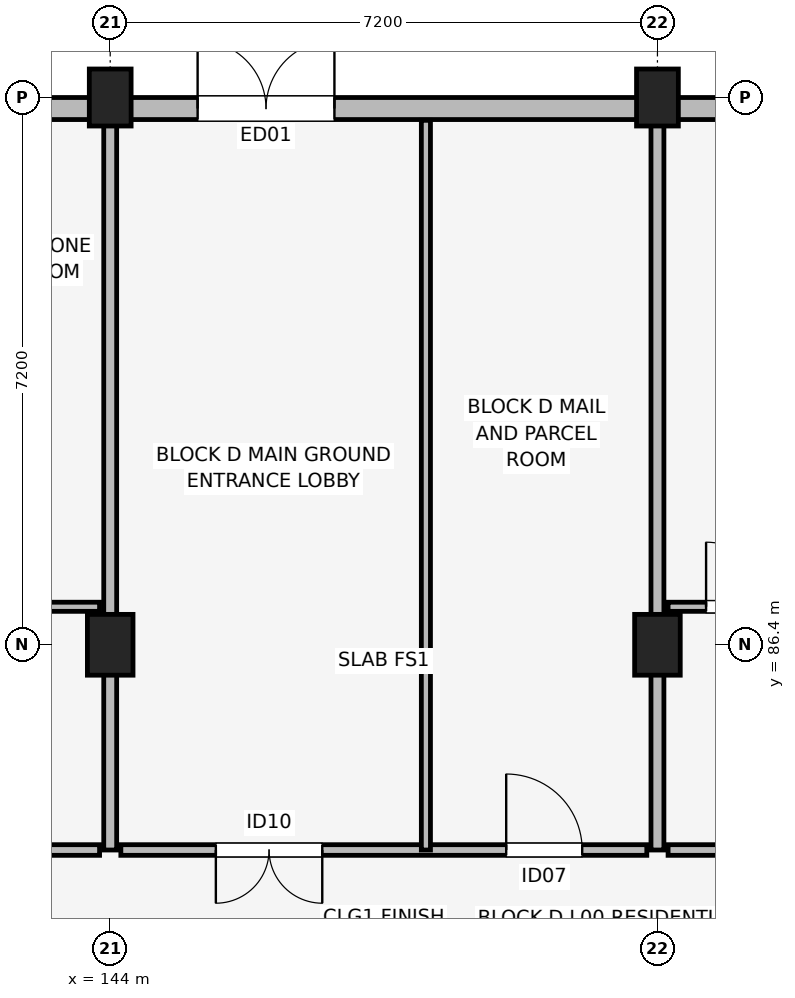
"""IFC4 building model, lengths in metres.
Left out: names, types, materials, properties, quantities, classifications, styles, units other than length and angle.
Written with IfcOpenShell. Run it as: python <this file> out.ifc"""

import sys

from ifc_helpers import new_model, si_unit, direction, frame, frame_2d, origin, origin_2d, place, context, subcontext, project, spatial, rectangle, extrude, element, fill, save


model = new_model("IFC4")
c1 = context("Model", 3, precision=1e-05, world=origin(), true_north=direction((0.0, 1.0)))
c2 = subcontext(c1, "Body", "Model", "MODEL_VIEW")
j1 = project(units=[si_unit("LENGTHUNIT", "METRE"), si_unit("PLANEANGLEUNIT", "RADIAN")], contexts=[c1])
p1 = place(None, origin())
s1 = spatial("IfcSite", under=j1, at=p1, CompositionType="ELEMENT")
p2 = place(p1, origin())
s2 = spatial("IfcBuilding", under=s1, at=p2, CompositionType="ELEMENT")
p3 = place(p2, origin())
s3 = spatial("IfcBuildingStorey", under=s2, at=p3, CompositionType="ELEMENT", Elevation=0.0)
p4 = place(p3, frame((144.0, 86.4, 0.0), z_axis=(0.0, 0.0, 1.0), x_axis=(1.0, 0.0, 0.0)))
e1 = element("IfcColumn", 1, at=p4, inside=s3, PredefinedType="COLUMN", context=c2, shape_type="SweptSolid", body=[
    extrude(rectangle(XDim=0.6, YDim=0.8, at=origin_2d()), origin(), (0.0, 0.0, 1.0), 4.5),
])
p5 = place(p3, frame((144.0, 93.6, 0.0), z_axis=(0.0, 0.0, 1.0), x_axis=(1.0, 0.0, 0.0)))
e2 = element("IfcColumn", 2, at=p5, inside=s3, PredefinedType="COLUMN", context=c2, shape_type="SweptSolid", body=[
    extrude(rectangle(XDim=0.55, YDim=0.75, at=origin_2d()), origin(), (0.0, 0.0, 1.0), 4.5),
])
p6 = place(p3, frame((151.2, 86.4, 0.0), z_axis=(0.0, 0.0, 1.0), x_axis=(1.0, 0.0, 0.0)))
e3 = element("IfcColumn", 3, at=p6, inside=s3, PredefinedType="COLUMN", context=c2, shape_type="SweptSolid", body=[
    extrude(rectangle(XDim=0.6, YDim=0.8, at=origin_2d()), origin(), (0.0, 0.0, 1.0), 4.5),
])
p7 = place(p3, frame((151.2, 93.6, 0.0), z_axis=(0.0, 0.0, 1.0), x_axis=(1.0, 0.0, 0.0)))
e4 = element("IfcColumn", 4, at=p7, inside=s3, PredefinedType="COLUMN", context=c2, shape_type="SweptSolid", body=[
    extrude(rectangle(XDim=0.55, YDim=0.75, at=origin_2d()), origin(), (0.0, 0.0, 1.0), 4.5),
])
p8 = place(p3, frame((162.8, 93.455, 0.0), z_axis=(0.0, 0.0, 1.0), x_axis=(-1.0, 0.0, 0.0)))
e5 = element("IfcWall", 5, at=p8, inside=s3, PredefinedType="SOLIDWALL", context=c2, shape_type="SweptSolid", body=[
    extrude(rectangle(XDim=30.4, YDim=0.29, at=frame_2d((15.2, 0.0))), origin(), (0.0, 0.0, 1.0), 3.33),
])
p9 = place(p8, frame((17.65, 0.0, 0.0), z_axis=(0.0, 0.0, 1.0), x_axis=(-1.0, 0.0, 0.0)))
e6 = element("IfcOpeningElement", 6, at=p9, cuts=e5, PredefinedType="OPENING", context=c2, shape_type="SweptSolid", body=[
    extrude(rectangle(XDim=1.8, YDim=2.4, at=frame_2d((0.9, 1.2))), frame((0.0, 0.155, 0.0), z_axis=(0.0, -1.0, 0.0), x_axis=(1.0, 0.0, 0.0)), (0.0, 0.0, 1.0), 0.31),
])
p10 = place(p8, frame((27.343, 0.0, 0.7)))
e7 = element("IfcOpeningElement", 7, at=p10, cuts=e5, PredefinedType="OPENING", context=c2, shape_type="SweptSolid", body=[
    extrude(rectangle(XDim=1.86, YDim=1.6, at=frame_2d((0.93, 0.8))), frame((0.0, 0.155, 0.0), z_axis=(0.0, -1.0, 0.0), x_axis=(1.0, 0.0, 0.0)), (0.0, 0.0, 1.0), 0.31),
])
p11 = place(p8, frame((24.238, 0.0, 0.75)))
e8 = element("IfcOpeningElement", 8, at=p11, cuts=e5, PredefinedType="OPENING", context=c2, shape_type="SweptSolid", body=[
    extrude(rectangle(XDim=0.98, YDim=1.45, at=frame_2d((0.49, 0.725))), frame((0.0, 0.155, 0.0), z_axis=(0.0, -1.0, 0.0), x_axis=(1.0, 0.0, 0.0)), (0.0, 0.0, 1.0), 0.31),
])
p12 = place(p8, frame((20.357, 0.0, 0.7)))
e9 = element("IfcOpeningElement", 9, at=p12, cuts=e5, PredefinedType="OPENING", context=c2, shape_type="SweptSolid", body=[
    extrude(rectangle(XDim=2.15, YDim=1.65, at=frame_2d((1.075, 0.825))), frame((0.0, 0.155, 0.0), z_axis=(0.0, -1.0, 0.0), x_axis=(1.0, 0.0, 0.0)), (0.0, 0.0, 1.0), 0.31),
])
p13 = place(p8, frame((6.85, 0.0, 0.7)))
e10 = element("IfcOpeningElement", 10, at=p13, cuts=e5, PredefinedType="OPENING", context=c2, shape_type="SweptSolid", body=[
    extrude(rectangle(XDim=2.3, YDim=1.65, at=frame_2d((1.15, 0.825))), frame((0.0, 0.155, 0.0), z_axis=(0.0, -1.0, 0.0), x_axis=(1.0, 0.0, 0.0)), (0.0, 0.0, 1.0), 0.31),
])
p14 = place(p8, frame((2.583, 0.0, 0.75)))
e11 = element("IfcOpeningElement", 11, at=p14, cuts=e5, PredefinedType="OPENING", context=c2, shape_type="SweptSolid", body=[
    extrude(rectangle(XDim=1.34, YDim=1.55, at=frame_2d((0.67, 0.775))), frame((0.0, 0.155, 0.0), z_axis=(0.0, -1.0, 0.0), x_axis=(1.0, 0.0, 0.0)), (0.0, 0.0, 1.0), 0.31),
])
p15 = place(p8, frame((0.555, 0.0, 0.75)))
e12 = element("IfcOpeningElement", 12, at=p15, cuts=e5, PredefinedType="OPENING", context=c2, shape_type="SweptSolid", body=[
    extrude(rectangle(XDim=1.46, YDim=1.55, at=frame_2d((0.73, 0.775))), frame((0.0, 0.155, 0.0), z_axis=(0.0, -1.0, 0.0), x_axis=(1.0, 0.0, 0.0)), (0.0, 0.0, 1.0), 0.31),
])
p16 = place(p3, frame((136.94, 83.7, 0.0), z_axis=(0.0, 0.0, 1.0), x_axis=(1.0, 0.0, 0.0)))
e13 = element("IfcWall", 13, at=p16, inside=s3, PredefinedType="PARTITIONING", context=c2, shape_type="SweptSolid", body=[
    extrude(rectangle(XDim=6.92, YDim=0.14, at=frame_2d((3.46, 0.0))), origin(), (0.0, 0.0, 1.0), 3.15),
])
p17 = place(p16, frame((6.125, 0.0, 0.0), z_axis=(0.0, 0.0, 1.0), x_axis=(-1.0, 0.0, 0.0)))
e14 = element("IfcOpeningElement", 14, at=p17, cuts=e13, PredefinedType="OPENING", context=c2, shape_type="SweptSolid", body=[
    extrude(rectangle(XDim=0.98, YDim=2.1, at=frame_2d((0.49, 1.05))), frame((0.0, 0.08, 0.0), z_axis=(0.0, -1.0, 0.0), x_axis=(1.0, 0.0, 0.0)), (0.0, 0.0, 1.0), 0.16),
])
p18 = place(p3, frame((136.94, 86.9, 0.0), z_axis=(0.0, 0.0, 1.0), x_axis=(1.0, 0.0, 0.0)))
e15 = element("IfcWall", 15, at=p18, inside=s3, PredefinedType="PARTITIONING", context=c2, shape_type="SweptSolid", body=[
    extrude(rectangle(XDim=6.92, YDim=0.12, at=frame_2d((3.46, 0.0))), origin(), (0.0, 0.0, 1.0), 3.15),
])
p19 = place(p18, frame((0.625, 0.0, 0.0)))
e16 = element("IfcOpeningElement", 16, at=p19, cuts=e15, PredefinedType="OPENING", context=c2, shape_type="SweptSolid", body=[
    extrude(rectangle(XDim=0.85, YDim=2.08, at=frame_2d((0.425, 1.04))), frame((0.0, 0.07, 0.0), z_axis=(0.0, -1.0, 0.0), x_axis=(1.0, 0.0, 0.0)), (0.0, 0.0, 1.0), 0.14),
])
p20 = place(p18, frame((3.675, 0.0, 0.0), z_axis=(0.0, 0.0, 1.0), x_axis=(-1.0, 0.0, 0.0)))
e17 = element("IfcOpeningElement", 17, at=p20, cuts=e15, PredefinedType="OPENING", context=c2, shape_type="SweptSolid", body=[
    extrude(rectangle(XDim=0.9, YDim=2.08, at=frame_2d((0.45, 1.04))), frame((0.0, 0.07, 0.0), z_axis=(0.0, -1.0, 0.0), x_axis=(1.0, 0.0, 0.0)), (0.0, 0.0, 1.0), 0.14),
])
p21 = place(p18, frame((5.16, 0.0, 0.0)))
e18 = element("IfcOpeningElement", 18, at=p21, cuts=e15, PredefinedType="OPENING", context=c2, shape_type="SweptSolid", body=[
    extrude(rectangle(XDim=0.95, YDim=2.08, at=frame_2d((0.475, 1.04))), frame((0.0, 0.07, 0.0), z_axis=(0.0, -1.0, 0.0), x_axis=(1.0, 0.0, 0.0)), (0.0, 0.0, 1.0), 0.14),
])
p22 = place(p3, frame((144.0, 83.7, 0.0), z_axis=(0.0, 0.0, 1.0), x_axis=(0.0, 1.0, 0.0)))
e19 = element("IfcWall", 19, at=p22, inside=s3, PredefinedType="PARTITIONING", context=c2, shape_type="SweptSolid", body=[
    extrude(rectangle(XDim=9.6, YDim=0.17, at=frame_2d((4.8, 0.0))), origin(), (0.0, 0.0, 1.0), 3.15),
])
p23 = place(p3, frame((144.14, 83.7, 0.0), z_axis=(0.0, 0.0, 1.0), x_axis=(1.0, 0.0, 0.0)))
e20 = element("IfcWall", 20, at=p23, inside=s3, PredefinedType="PARTITIONING", context=c2, shape_type="SweptSolid", body=[
    extrude(rectangle(XDim=6.92, YDim=0.14, at=frame_2d((3.46, 0.0))), origin(), (0.0, 0.0, 1.0), 3.15),
])
p24 = place(p23, frame((2.65, 0.0, 0.0), z_axis=(0.0, 0.0, 1.0), x_axis=(-1.0, 0.0, 0.0)))
e21 = element("IfcOpeningElement", 21, at=p24, cuts=e20, PredefinedType="OPENING", context=c2, shape_type="SweptSolid", body=[
    extrude(rectangle(XDim=1.4, YDim=2.22, at=frame_2d((0.7, 1.11))), frame((0.0, 0.08, 0.0), z_axis=(0.0, -1.0, 0.0), x_axis=(1.0, 0.0, 0.0)), (0.0, 0.0, 1.0), 0.16),
])
p25 = place(p23, frame((5.07, 0.0, 0.0)))
e22 = element("IfcOpeningElement", 22, at=p25, cuts=e20, PredefinedType="OPENING", context=c2, shape_type="SweptSolid", body=[
    extrude(rectangle(XDim=1.0, YDim=2.12, at=frame_2d((0.5, 1.06))), frame((0.0, 0.08, 0.0), z_axis=(0.0, -1.0, 0.0), x_axis=(1.0, 0.0, 0.0)), (0.0, 0.0, 1.0), 0.16),
])
p26 = place(p3, frame((148.154, 83.7, 0.0), z_axis=(0.0, 0.0, 1.0), x_axis=(0.0, 1.0, 0.0)))
e23 = element("IfcWall", 23, at=p26, inside=s3, PredefinedType="PARTITIONING", context=c2, shape_type="SweptSolid", body=[
    extrude(rectangle(XDim=9.6, YDim=0.12, at=frame_2d((4.8, 0.0))), origin(), (0.0, 0.0, 1.0), 3.15),
])
p27 = place(p3, frame((151.2, 83.7, 0.0), z_axis=(0.0, 0.0, 1.0), x_axis=(0.0, 1.0, 0.0)))
e24 = element("IfcWall", 24, at=p27, inside=s3, PredefinedType="PARTITIONING", context=c2, shape_type="SweptSolid", body=[
    extrude(rectangle(XDim=9.6, YDim=0.17, at=frame_2d((4.8, 0.0))), origin(), (0.0, 0.0, 1.0), 3.15),
])
p28 = place(p3, frame((151.34, 83.7, 0.0), z_axis=(0.0, 0.0, 1.0), x_axis=(1.0, 0.0, 0.0)))
e25 = element("IfcWall", 25, at=p28, inside=s3, PredefinedType="PARTITIONING", context=c2, shape_type="SweptSolid", body=[
    extrude(rectangle(XDim=6.92, YDim=0.14, at=frame_2d((3.46, 0.0))), origin(), (0.0, 0.0, 1.0), 3.15),
])
p29 = place(p28, frame((5.85, 0.0, 0.0), z_axis=(0.0, 0.0, 1.0), x_axis=(-1.0, 0.0, 0.0)))
e26 = element("IfcOpeningElement", 26, at=p29, cuts=e25, PredefinedType="OPENING", context=c2, shape_type="SweptSolid", body=[
    extrude(rectangle(XDim=0.98, YDim=2.1, at=frame_2d((0.49, 1.05))), frame((0.0, 0.08, 0.0), z_axis=(0.0, -1.0, 0.0), x_axis=(1.0, 0.0, 0.0)), (0.0, 0.0, 1.0), 0.16),
])
p30 = place(p3, frame((151.34, 86.9, 0.0), z_axis=(0.0, 0.0, 1.0), x_axis=(1.0, 0.0, 0.0)))
e27 = element("IfcWall", 27, at=p30, inside=s3, PredefinedType="PARTITIONING", context=c2, shape_type="SweptSolid", body=[
    extrude(rectangle(XDim=6.92, YDim=0.12, at=frame_2d((3.46, 0.0))), origin(), (0.0, 0.0, 1.0), 3.15),
])
p31 = place(p30, frame((0.5, 0.0, 0.0)))
e28 = element("IfcOpeningElement", 28, at=p31, cuts=e27, PredefinedType="OPENING", context=c2, shape_type="SweptSolid", body=[
    extrude(rectangle(XDim=0.85, YDim=2.08, at=frame_2d((0.425, 1.04))), frame((0.0, 0.07, 0.0), z_axis=(0.0, -1.0, 0.0), x_axis=(1.0, 0.0, 0.0)), (0.0, 0.0, 1.0), 0.14),
])
p32 = place(p30, frame((3.275, 0.0, 0.0), z_axis=(0.0, 0.0, 1.0), x_axis=(-1.0, 0.0, 0.0)))
e29 = element("IfcOpeningElement", 29, at=p32, cuts=e27, PredefinedType="OPENING", context=c2, shape_type="SweptSolid", body=[
    extrude(rectangle(XDim=0.9, YDim=2.08, at=frame_2d((0.45, 1.04))), frame((0.0, 0.07, 0.0), z_axis=(0.0, -1.0, 0.0), x_axis=(1.0, 0.0, 0.0)), (0.0, 0.0, 1.0), 0.14),
])
p33 = place(p30, frame((4.885, 0.0, 0.0)))
e30 = element("IfcOpeningElement", 30, at=p33, cuts=e27, PredefinedType="OPENING", context=c2, shape_type="SweptSolid", body=[
    extrude(rectangle(XDim=0.95, YDim=2.08, at=frame_2d((0.475, 1.04))), frame((0.0, 0.07, 0.0), z_axis=(0.0, -1.0, 0.0), x_axis=(1.0, 0.0, 0.0)), (0.0, 0.0, 1.0), 0.14),
])
p34 = place(p9, origin())
e31 = element("IfcDoor", 31, at=p34, inside=s3, OperationType="DOUBLE_DOOR_SINGLE_SWING", PredefinedType="DOOR", context=c2, shape_type="SweptSolid", body=[
    extrude(rectangle(XDim=1.8, YDim=2.4, at=frame_2d((0.9, 1.2))), frame((0.0, 0.025, 0.0), z_axis=(0.0, -1.0, 0.0), x_axis=(1.0, 0.0, 0.0)), (0.0, 0.0, 1.0), 0.05),
])
fill(e6, e31)
p35 = place(p24, origin())
e32 = element("IfcDoor", 32, at=p35, inside=s3, OperationType="DOUBLE_DOOR_SINGLE_SWING", PredefinedType="DOOR", context=c2, shape_type="SweptSolid", body=[
    extrude(rectangle(XDim=1.4, YDim=2.22, at=frame_2d((0.7, 1.11))), frame((0.0, 0.025, 0.0), z_axis=(0.0, -1.0, 0.0), x_axis=(1.0, 0.0, 0.0)), (0.0, 0.0, 1.0), 0.05),
])
fill(e21, e32)
p36 = place(p25, origin())
e33 = element("IfcDoor", 33, at=p36, inside=s3, OperationType="SINGLE_SWING_LEFT", PredefinedType="DOOR", context=c2, shape_type="SweptSolid", body=[
    extrude(rectangle(XDim=1.0, YDim=2.12, at=frame_2d((0.5, 1.06))), frame((0.0, 0.025, 0.0), z_axis=(0.0, -1.0, 0.0), x_axis=(1.0, 0.0, 0.0)), (0.0, 0.0, 1.0), 0.05),
])
fill(e22, e33)
p37 = place(p31, origin())
e34 = element("IfcDoor", 34, at=p37, inside=s3, OperationType="SINGLE_SWING_LEFT", PredefinedType="DOOR", context=c2, shape_type="SweptSolid", body=[
    extrude(rectangle(XDim=0.85, YDim=2.08, at=frame_2d((0.425, 1.04))), frame((0.0, 0.025, 0.0), z_axis=(0.0, -1.0, 0.0), x_axis=(1.0, 0.0, 0.0)), (0.0, 0.0, 1.0), 0.05),
])
fill(e28, e34)
save(model, sys.argv[1])
